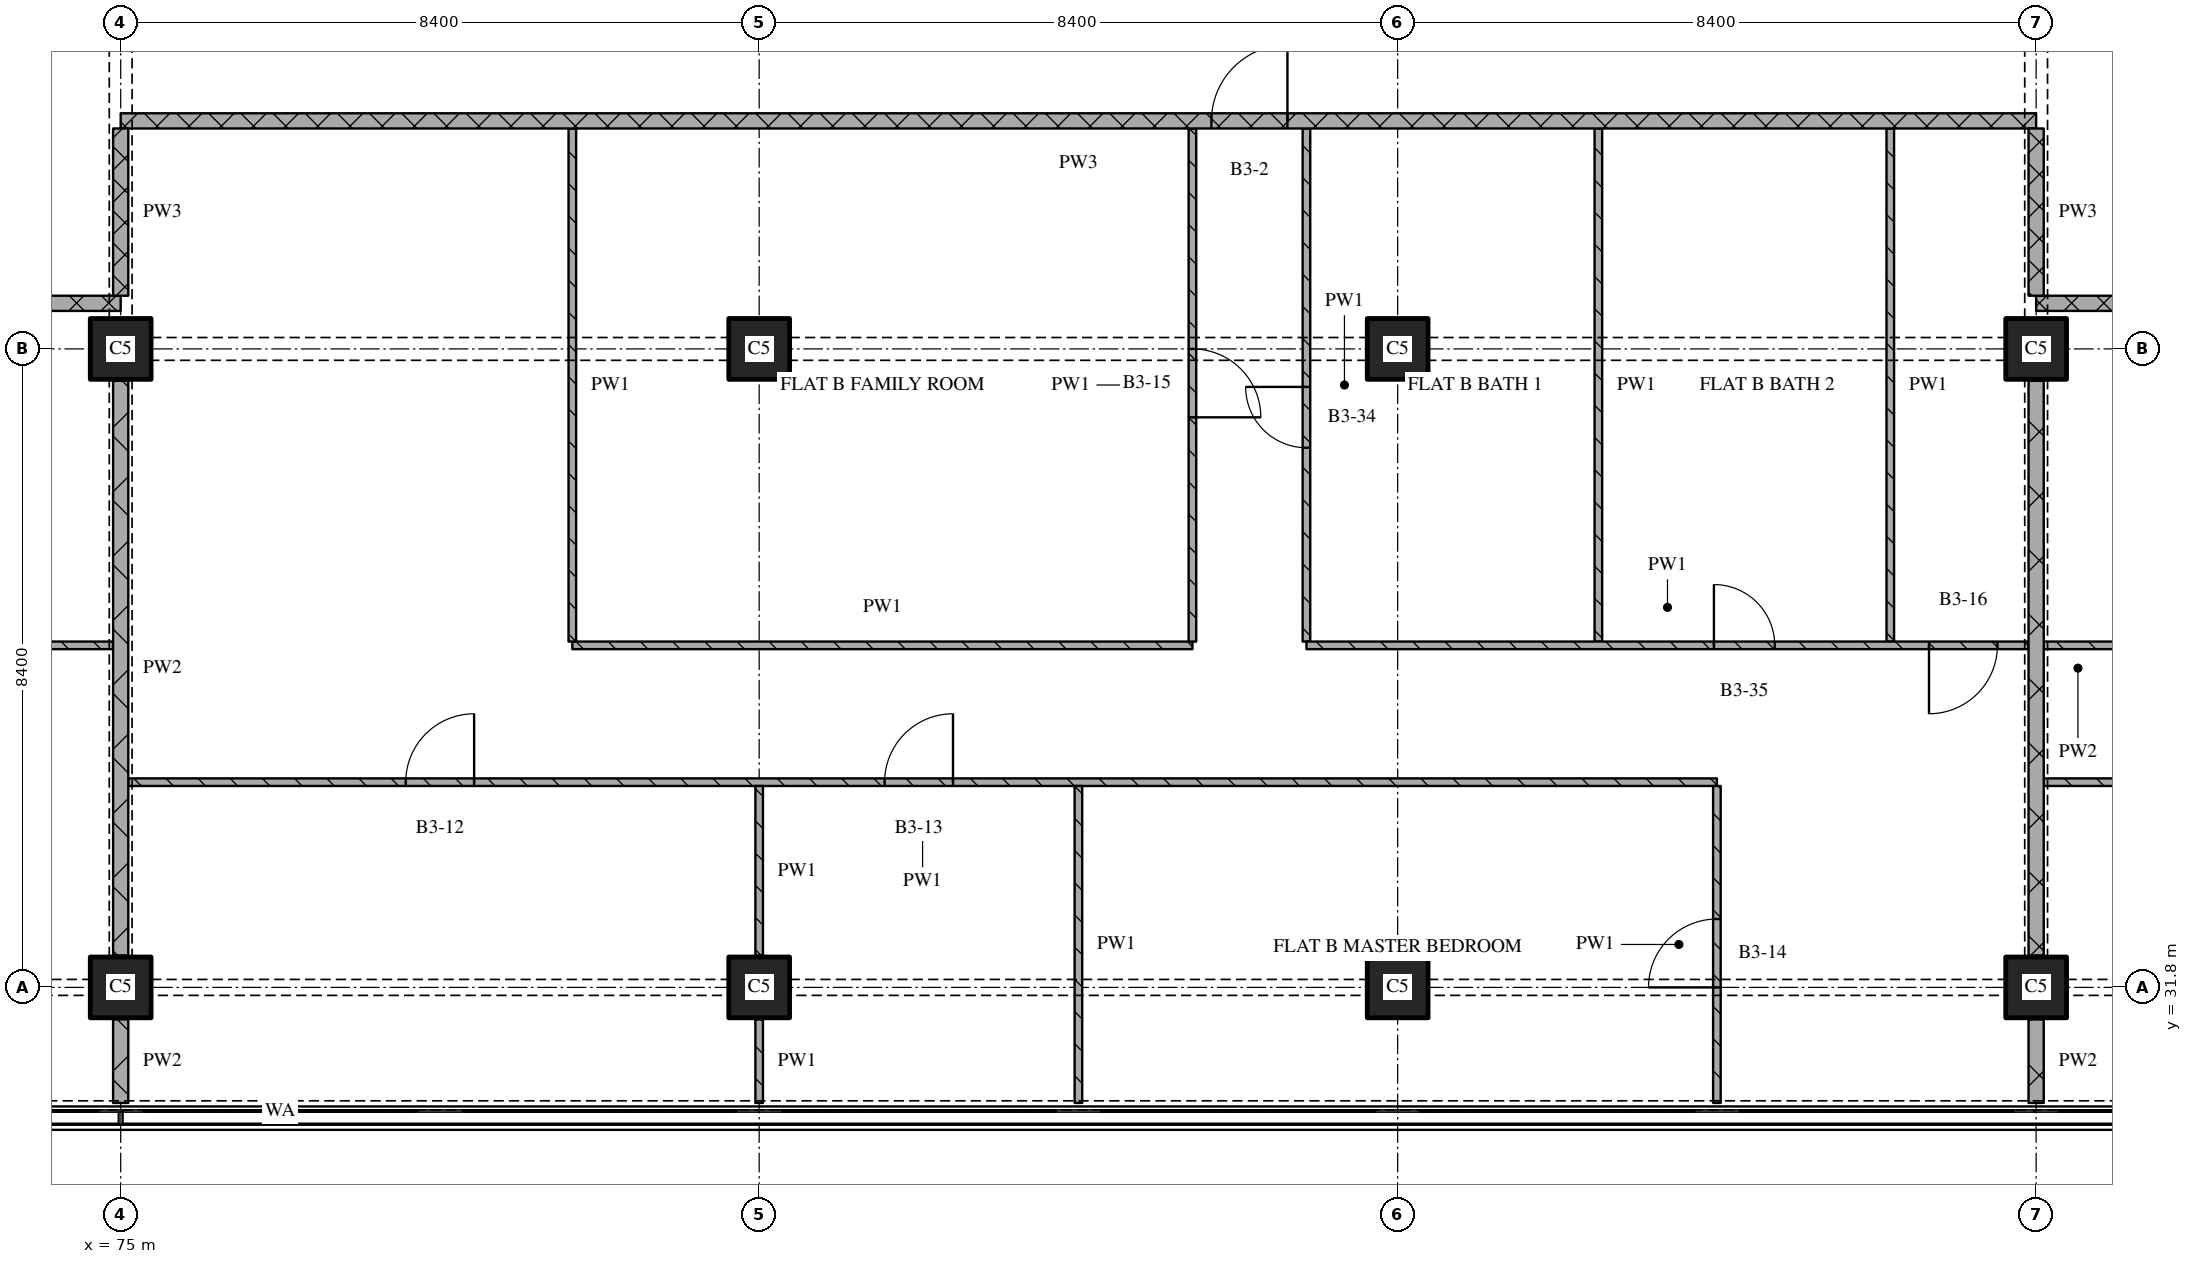
"""IFC4 building model, lengths in metres.
Left out: names, types, materials, properties, quantities, classifications, styles, units other than length and angle.
Written with IfcOpenShell. Run it as: python <this file> out.ifc"""

import sys

from ifc_helpers import new_model, si_unit, direction, frame, frame_2d, origin, origin_2d, place, context, subcontext, project, spatial, rectangle, extrude, element, fill, save


model = new_model("IFC4")
c1 = context("Model", 3, precision=1e-05, world=origin(), true_north=direction((0.0, 1.0)))
c2 = subcontext(c1, "Body", "Model", "MODEL_VIEW")
j1 = project(units=[si_unit("LENGTHUNIT", "METRE"), si_unit("PLANEANGLEUNIT", "RADIAN")], contexts=[c1])
p1 = place(None, origin())
s1 = spatial("IfcSite", under=j1, at=p1, CompositionType="ELEMENT")
p2 = place(p1, origin())
s2 = spatial("IfcBuilding", under=s1, at=p2, CompositionType="ELEMENT")
p3 = place(p2, frame((0.0, 0.0, 116.85)))
s3 = spatial("IfcBuildingStorey", under=s2, at=p3, CompositionType="ELEMENT", Elevation=116.85)
for number, where, z_axis, x_axis in (
    (1, (75.0, 31.8, 0.0), (0.0, 0.0, 1.0), (1.0, 0.0, 0.0)),
    (2, (75.0, 40.2, 0.0), (0.0, 0.0, 1.0), (1.0, 0.0, 0.0)),
    (3, (83.4, 31.8, 0.0), (0.0, 0.0, 1.0), (1.0, 0.0, 0.0)),
    (4, (83.4, 40.2, 0.0), (0.0, 0.0, 1.0), (1.0, 0.0, 0.0)),
    (5, (91.8, 31.8, 0.0), (0.0, 0.0, 1.0), (1.0, 0.0, 0.0)),
    (6, (91.8, 40.2, 0.0), (0.0, 0.0, 1.0), (1.0, 0.0, 0.0)),
    (7, (100.2, 31.8, 0.0), (0.0, 0.0, 1.0), (1.0, 0.0, 0.0)),
    (8, (100.2, 40.2, 0.0), (0.0, 0.0, 1.0), (1.0, 0.0, 0.0)),
):
    element("IfcColumn", number, at=place(p3, frame(where, z_axis=z_axis, x_axis=x_axis)), inside=s3, PredefinedType="COLUMN", context=c2, shape_type="SweptSolid", body=[
        extrude(rectangle(XDim=0.8, YDim=0.8, at=origin_2d()), origin(), (0.0, 0.0, 1.0), 3.6),
    ])
p4 = place(p3, frame((96.0, 34.5, 0.0), z_axis=(0.0, 0.0, 1.0), x_axis=(-1.0, 0.0, 0.0)))
e9 = element("IfcWall", 9, at=p4, inside=s3, PredefinedType="PARTITIONING", context=c2, shape_type="SweptSolid", body=[
    extrude(rectangle(XDim=20.9, YDim=0.1, at=frame_2d((10.45, 0.0))), origin(), (0.0, 0.0, 1.0), 3.32),
])
p5 = place(p4, frame((10.05, 0.0, 0.0)))
e10 = element("IfcOpeningElement", 10, at=p5, cuts=e9, PredefinedType="OPENING", context=c2, shape_type="SweptSolid", body=[
    extrude(rectangle(XDim=0.9, YDim=2.1, at=frame_2d((0.45, 1.05))), frame((0.0, 0.06, 0.0), z_axis=(0.0, -1.0, 0.0), x_axis=(1.0, 0.0, 0.0)), (0.0, 0.0, 1.0), 0.12),
])
p6 = place(p4, frame((16.35, 0.0, 0.0)))
e11 = element("IfcOpeningElement", 11, at=p6, cuts=e9, PredefinedType="OPENING", context=c2, shape_type="SweptSolid", body=[
    extrude(rectangle(XDim=0.9, YDim=2.1, at=frame_2d((0.45, 1.05))), frame((0.0, 0.06, 0.0), z_axis=(0.0, -1.0, 0.0), x_axis=(1.0, 0.0, 0.0)), (0.0, 0.0, 1.0), 0.12),
])
p7 = place(p3, frame((112.8, 34.5, 0.0), z_axis=(0.0, 0.0, 1.0), x_axis=(-1.0, 0.0, 0.0)))
e12 = element("IfcWall", 12, at=p7, inside=s3, PredefinedType="PARTITIONING", context=c2, shape_type="SweptSolid", body=[
    extrude(rectangle(XDim=12.5, YDim=0.1, at=frame_2d((6.25, 0.0))), origin(), (0.0, 0.0, 1.0), 3.32),
])
p8 = place(p7, frame((7.95, 0.0, 0.0)))
e13 = element("IfcOpeningElement", 13, at=p8, cuts=e12, PredefinedType="OPENING", context=c2, shape_type="SweptSolid", body=[
    extrude(rectangle(XDim=0.9, YDim=2.1, at=frame_2d((0.45, 1.05))), frame((0.0, 0.06, 0.0), z_axis=(0.0, -1.0, 0.0), x_axis=(1.0, 0.0, 0.0)), (0.0, 0.0, 1.0), 0.12),
])
p9 = place(p3, frame((64.8, 36.3, 0.0), z_axis=(0.0, 0.0, 1.0), x_axis=(1.0, 0.0, 0.0)))
e14 = element("IfcWall", 14, at=p9, inside=s3, PredefinedType="PARTITIONING", context=c2, shape_type="SweptSolid", body=[
    extrude(rectangle(XDim=10.1, YDim=0.1, at=frame_2d((5.05, 0.0))), origin(), (0.0, 0.0, 1.0), 3.32),
])
p10 = place(p9, frame((6.95, 0.0, 0.0)))
e15 = element("IfcOpeningElement", 15, at=p10, cuts=e14, PredefinedType="OPENING", context=c2, shape_type="SweptSolid", body=[
    extrude(rectangle(XDim=0.8, YDim=2.1, at=frame_2d((0.4, 1.05))), frame((0.0, 0.06, 0.0), z_axis=(0.0, -1.0, 0.0), x_axis=(1.0, 0.0, 0.0)), (0.0, 0.0, 1.0), 0.12),
])
p11 = place(p3, frame((80.942, 36.3, 0.0), z_axis=(0.0, 0.0, 1.0), x_axis=(1.0, 0.0, 0.0)))
e16 = element("IfcWall", 16, at=p11, inside=s3, PredefinedType="PARTITIONING", context=c2, shape_type="SweptSolid", body=[
    extrude(rectangle(XDim=8.158, YDim=0.1, at=frame_2d((4.079, 0.0))), origin(), (0.0, 0.0, 1.0), 3.32),
])
p12 = place(p3, frame((75.0, 40.8, 0.0), z_axis=(0.0, 0.0, 1.0), x_axis=(-1.0, 0.0, 0.0)))
e17 = element("IfcWall", 17, at=p12, inside=s3, PredefinedType="PARTITIONING", context=c2, shape_type="SweptSolid", body=[
    extrude(rectangle(XDim=24.18, YDim=0.2, at=frame_2d((12.09, 0.0))), origin(), (0.0, 0.0, 1.0), 3.32),
])
p13 = place(p12, frame((10.45, 0.0, 0.0)))
e18 = element("IfcOpeningElement", 18, at=p13, cuts=e17, PredefinedType="OPENING", context=c2, shape_type="SweptSolid", body=[
    extrude(rectangle(XDim=1.0, YDim=2.1, at=frame_2d((0.5, 1.05))), frame((0.0, 0.11, 0.0), z_axis=(0.0, -1.0, 0.0), x_axis=(1.0, 0.0, 0.0)), (0.0, 0.0, 1.0), 0.22),
])
p14 = place(p3, frame((124.38, 40.8, 0.0), z_axis=(0.0, 0.0, 1.0), x_axis=(-1.0, 0.0, 0.0)))
e19 = element("IfcWall", 19, at=p14, inside=s3, PredefinedType="PARTITIONING", context=c2, shape_type="SweptSolid", body=[
    extrude(rectangle(XDim=24.18, YDim=0.2, at=frame_2d((12.09, 0.0))), origin(), (0.0, 0.0, 1.0), 3.32),
])
p15 = place(p14, frame((16.33, 0.0, 0.0)))
e20 = element("IfcOpeningElement", 20, at=p15, cuts=e19, PredefinedType="OPENING", context=c2, shape_type="SweptSolid", body=[
    extrude(rectangle(XDim=1.0, YDim=2.1, at=frame_2d((0.5, 1.05))), frame((0.0, 0.11, 0.0), z_axis=(0.0, -1.0, 0.0), x_axis=(1.0, 0.0, 0.0)), (0.0, 0.0, 1.0), 0.22),
])
p16 = place(p3, frame((100.2, 43.2, 0.0), z_axis=(0.0, 0.0, 1.0), x_axis=(-1.0, 0.0, 0.0)))
e21 = element("IfcWall", 21, at=p16, inside=s3, PredefinedType="PARTITIONING", context=c2, shape_type="SweptSolid", body=[
    extrude(rectangle(XDim=25.2, YDim=0.2, at=frame_2d((12.6, 0.0))), origin(), (0.0, 0.0, 1.0), 3.32),
])
p17 = place(p16, frame((9.85, 0.0, 0.0)))
e22 = element("IfcOpeningElement", 22, at=p17, cuts=e21, PredefinedType="OPENING", context=c2, shape_type="SweptSolid", body=[
    extrude(rectangle(XDim=1.0, YDim=2.1, at=frame_2d((0.5, 1.05))), frame((0.0, 0.11, 0.0), z_axis=(0.0, -1.0, 0.0), x_axis=(1.0, 0.0, 0.0)), (0.0, 0.0, 1.0), 0.22),
])
p18 = place(p3, frame((75.0, 43.1, 0.0), z_axis=(0.0, 0.0, 1.0), x_axis=(0.0, -1.0, 0.0)))
e23 = element("IfcWall", 23, at=p18, inside=s3, PredefinedType="PARTITIONING", context=c2, shape_type="SweptSolid", body=[
    extrude(rectangle(XDim=2.2, YDim=0.2, at=frame_2d((1.1, 0.0))), origin(), (0.0, 0.0, 1.0), 2.43),
])
p19 = place(p3, frame((75.0, 31.38, 0.0), z_axis=(0.0, 0.0, 1.0), x_axis=(0.0, -1.0, 0.0)))
e24 = element("IfcWall", 24, at=p19, inside=s3, PredefinedType="PARTITIONING", context=c2, shape_type="SweptSolid", body=[
    extrude(rectangle(XDim=1.1, YDim=0.2, at=frame_2d((0.55, 0.0))), origin(), (0.0, 0.0, 1.0), 3.32),
])
p20 = place(p3, frame((75.0, 39.78, 0.0), z_axis=(0.0, 0.0, 1.0), x_axis=(0.0, -1.0, 0.0)))
e25 = element("IfcWall", 25, at=p20, inside=s3, PredefinedType="PARTITIONING", context=c2, shape_type="SweptSolid", body=[
    extrude(rectangle(XDim=7.56, YDim=0.2, at=frame_2d((3.78, 0.0))), origin(), (0.0, 0.0, 1.0), 2.83),
])
p21 = place(p3, frame((80.942, 43.1, 0.0), z_axis=(0.0, 0.0, 1.0), x_axis=(0.0, -1.0, 0.0)))
e26 = element("IfcWall", 26, at=p21, inside=s3, PredefinedType="PARTITIONING", context=c2, shape_type="SweptSolid", body=[
    extrude(rectangle(XDim=6.75, YDim=0.1, at=frame_2d((3.375, 0.0))), origin(), (0.0, 0.0, 1.0), 3.32),
])
p22 = place(p3, frame((83.4, 31.38, 0.0), z_axis=(0.0, 0.0, 1.0), x_axis=(0.0, -1.0, 0.0)))
e27 = element("IfcWall", 27, at=p22, inside=s3, PredefinedType="PARTITIONING", context=c2, shape_type="SweptSolid", body=[
    extrude(rectangle(XDim=1.1, YDim=0.1, at=frame_2d((0.55, 0.0))), origin(), (0.0, 0.0, 1.0), 3.32),
])
p23 = place(p3, frame((83.4, 34.45, 0.0), z_axis=(0.0, 0.0, 1.0), x_axis=(0.0, -1.0, 0.0)))
e28 = element("IfcWall", 28, at=p23, inside=s3, PredefinedType="PARTITIONING", context=c2, shape_type="SweptSolid", body=[
    extrude(rectangle(XDim=2.23, YDim=0.1, at=frame_2d((1.115, 0.0))), origin(), (0.0, 0.0, 1.0), 3.32),
])
p24 = place(p3, frame((87.6, 34.45, 0.0), z_axis=(0.0, 0.0, 1.0), x_axis=(0.0, -1.0, 0.0)))
e29 = element("IfcWall", 29, at=p24, inside=s3, PredefinedType="PARTITIONING", context=c2, shape_type="SweptSolid", body=[
    extrude(rectangle(XDim=4.17, YDim=0.1, at=frame_2d((2.085, 0.0))), origin(), (0.0, 0.0, 1.0), 3.32),
])
p25 = place(p3, frame((89.1, 36.35, 0.0), z_axis=(0.0, 0.0, 1.0), x_axis=(0.0, 1.0, 0.0)))
e30 = element("IfcWall", 30, at=p25, inside=s3, PredefinedType="PARTITIONING", context=c2, shape_type="SweptSolid", body=[
    extrude(rectangle(XDim=6.75, YDim=0.1, at=frame_2d((3.375, 0.0))), origin(), (0.0, 0.0, 1.0), 3.32),
])
p26 = place(p25, frame((2.95, 0.0, 0.0)))
e31 = element("IfcOpeningElement", 31, at=p26, cuts=e30, PredefinedType="OPENING", context=c2, shape_type="SweptSolid", body=[
    extrude(rectangle(XDim=0.9, YDim=2.1, at=frame_2d((0.45, 1.05))), frame((0.0, 0.06, 0.0), z_axis=(0.0, -1.0, 0.0), x_axis=(1.0, 0.0, 0.0)), (0.0, 0.0, 1.0), 0.12),
])
p27 = place(p3, frame((90.6, 43.1, 0.0), z_axis=(0.0, 0.0, 1.0), x_axis=(0.0, -1.0, 0.0)))
e32 = element("IfcWall", 32, at=p27, inside=s3, PredefinedType="PARTITIONING", context=c2, shape_type="SweptSolid", body=[
    extrude(rectangle(XDim=6.75, YDim=0.1, at=frame_2d((3.375, 0.0))), origin(), (0.0, 0.0, 1.0), 3.32),
])
p28 = place(p27, frame((3.4, 0.0, 0.0)))
e33 = element("IfcOpeningElement", 33, at=p28, cuts=e32, PredefinedType="OPENING", context=c2, shape_type="SweptSolid", body=[
    extrude(rectangle(XDim=0.8, YDim=2.1, at=frame_2d((0.4, 1.05))), frame((0.0, 0.06, 0.0), z_axis=(0.0, -1.0, 0.0), x_axis=(1.0, 0.0, 0.0)), (0.0, 0.0, 1.0), 0.12),
])
p29 = place(p3, frame((94.441, 43.1, 0.0), z_axis=(0.0, 0.0, 1.0), x_axis=(0.0, -1.0, 0.0)))
e34 = element("IfcWall", 34, at=p29, inside=s3, PredefinedType="PARTITIONING", context=c2, shape_type="SweptSolid", body=[
    extrude(rectangle(XDim=6.75, YDim=0.1, at=frame_2d((3.375, 0.0))), origin(), (0.0, 0.0, 1.0), 3.32),
])
p30 = place(p3, frame((96.0, 30.28, 0.0), z_axis=(0.0, 0.0, 1.0), x_axis=(0.0, 1.0, 0.0)))
e35 = element("IfcWall", 35, at=p30, inside=s3, PredefinedType="PARTITIONING", context=c2, shape_type="SweptSolid", body=[
    extrude(rectangle(XDim=4.17, YDim=0.1, at=frame_2d((2.085, 0.0))), origin(), (0.0, 0.0, 1.0), 3.32),
])
p31 = place(p30, frame((1.52, 0.0, 0.0)))
e36 = element("IfcOpeningElement", 36, at=p31, cuts=e35, PredefinedType="OPENING", context=c2, shape_type="SweptSolid", body=[
    extrude(rectangle(XDim=0.9, YDim=2.1, at=frame_2d((0.45, 1.05))), frame((0.0, 0.06, 0.0), z_axis=(0.0, -1.0, 0.0), x_axis=(1.0, 0.0, 0.0)), (0.0, 0.0, 1.0), 0.12),
])
p32 = place(p3, frame((98.281, 43.1, 0.0), z_axis=(0.0, 0.0, 1.0), x_axis=(0.0, -1.0, 0.0)))
e37 = element("IfcWall", 37, at=p32, inside=s3, PredefinedType="PARTITIONING", context=c2, shape_type="SweptSolid", body=[
    extrude(rectangle(XDim=6.75, YDim=0.1, at=frame_2d((3.375, 0.0))), origin(), (0.0, 0.0, 1.0), 3.32),
])
p33 = place(p3, frame((100.2, 43.1, 0.0), z_axis=(0.0, 0.0, 1.0), x_axis=(0.0, -1.0, 0.0)))
e38 = element("IfcWall", 38, at=p33, inside=s3, PredefinedType="PARTITIONING", context=c2, shape_type="SweptSolid", body=[
    extrude(rectangle(XDim=2.2, YDim=0.2, at=frame_2d((1.1, 0.0))), origin(), (0.0, 0.0, 1.0), 2.43),
])
p34 = place(p3, frame((100.2, 31.38, 0.0), z_axis=(0.0, 0.0, 1.0), x_axis=(0.0, -1.0, 0.0)))
e39 = element("IfcWall", 39, at=p34, inside=s3, PredefinedType="PARTITIONING", context=c2, shape_type="SweptSolid", body=[
    extrude(rectangle(XDim=1.1, YDim=0.2, at=frame_2d((0.55, 0.0))), origin(), (0.0, 0.0, 1.0), 3.32),
])
p35 = place(p3, frame((100.2, 39.78, 0.0), z_axis=(0.0, 0.0, 1.0), x_axis=(0.0, -1.0, 0.0)))
e40 = element("IfcWall", 40, at=p35, inside=s3, PredefinedType="PARTITIONING", context=c2, shape_type="SweptSolid", body=[
    extrude(rectangle(XDim=7.56, YDim=0.2, at=frame_2d((3.78, 0.0))), origin(), (0.0, 0.0, 1.0), 2.83),
])
p36 = place(p3, frame((90.6, 36.3, 0.0), z_axis=(0.0, 0.0, 1.0), x_axis=(1.0, 0.0, 0.0)))
e41 = element("IfcWall", 41, at=p36, inside=s3, PredefinedType="PARTITIONING", context=c2, shape_type="SweptSolid", body=[
    extrude(rectangle(XDim=9.5, YDim=0.1, at=frame_2d((4.75, 0.0))), origin(), (0.0, 0.0, 1.0), 3.32),
])
p37 = place(p36, frame((5.361, 0.0, 0.0)))
e42 = element("IfcOpeningElement", 42, at=p37, cuts=e41, PredefinedType="OPENING", context=c2, shape_type="SweptSolid", body=[
    extrude(rectangle(XDim=0.8, YDim=2.1, at=frame_2d((0.4, 1.05))), frame((0.0, 0.06, 0.0), z_axis=(0.0, -1.0, 0.0), x_axis=(1.0, 0.0, 0.0)), (0.0, 0.0, 1.0), 0.12),
])
p38 = place(p36, frame((8.191, 0.0, 0.0)))
e43 = element("IfcOpeningElement", 43, at=p38, cuts=e41, PredefinedType="OPENING", context=c2, shape_type="SweptSolid", body=[
    extrude(rectangle(XDim=0.9, YDim=2.1, at=frame_2d((0.45, 1.05))), frame((0.0, 0.06, 0.0), z_axis=(0.0, -1.0, 0.0), x_axis=(1.0, 0.0, 0.0)), (0.0, 0.0, 1.0), 0.12),
])
p39 = place(p3, frame((100.3, 36.3, 0.0), z_axis=(0.0, 0.0, 1.0), x_axis=(1.0, 0.0, 0.0)))
e44 = element("IfcWall", 44, at=p39, inside=s3, PredefinedType="PARTITIONING", context=c2, shape_type="SweptSolid", body=[
    extrude(rectangle(XDim=6.5, YDim=0.1, at=frame_2d((3.25, 0.0))), origin(), (0.0, 0.0, 1.0), 3.32),
])
p40 = place(p39, frame((1.75, 0.0, 0.0)))
e45 = element("IfcOpeningElement", 45, at=p40, cuts=e44, PredefinedType="OPENING", context=c2, shape_type="SweptSolid", body=[
    extrude(rectangle(XDim=0.8, YDim=2.1, at=frame_2d((0.4, 1.05))), frame((0.0, 0.06, 0.0), z_axis=(0.0, -1.0, 0.0), x_axis=(1.0, 0.0, 0.0)), (0.0, 0.0, 1.0), 0.12),
])
p41 = place(p5, origin())
e46 = element("IfcDoor", 46, at=p41, inside=s3, OperationType="SINGLE_SWING_RIGHT", PredefinedType="DOOR", context=c2, shape_type="SweptSolid", body=[
    extrude(rectangle(XDim=0.9, YDim=2.1, at=frame_2d((0.45, 1.05))), frame((0.0, 0.025, 0.0), z_axis=(0.0, -1.0, 0.0), x_axis=(1.0, 0.0, 0.0)), (0.0, 0.0, 1.0), 0.05),
])
fill(e10, e46)
p42 = place(p6, origin())
e47 = element("IfcDoor", 47, at=p42, inside=s3, OperationType="SINGLE_SWING_RIGHT", PredefinedType="DOOR", context=c2, shape_type="SweptSolid", body=[
    extrude(rectangle(XDim=0.9, YDim=2.1, at=frame_2d((0.45, 1.05))), frame((0.0, 0.025, 0.0), z_axis=(0.0, -1.0, 0.0), x_axis=(1.0, 0.0, 0.0)), (0.0, 0.0, 1.0), 0.05),
])
fill(e11, e47)
p43 = place(p17, origin())
e48 = element("IfcDoor", 48, at=p43, inside=s3, OperationType="SINGLE_SWING_RIGHT", PredefinedType="DOOR", context=c2, shape_type="SweptSolid", body=[
    extrude(rectangle(XDim=1.0, YDim=2.1, at=frame_2d((0.5, 1.05))), frame((0.0, 0.025, 0.0), z_axis=(0.0, -1.0, 0.0), x_axis=(1.0, 0.0, 0.0)), (0.0, 0.0, 1.0), 0.05),
])
fill(e22, e48)
p44 = place(p26, origin())
e49 = element("IfcDoor", 49, at=p44, inside=s3, OperationType="SINGLE_SWING_RIGHT", PredefinedType="DOOR", context=c2, shape_type="SweptSolid", body=[
    extrude(rectangle(XDim=0.9, YDim=2.1, at=frame_2d((0.45, 1.05))), frame((0.0, 0.025, 0.0), z_axis=(0.0, -1.0, 0.0), x_axis=(1.0, 0.0, 0.0)), (0.0, 0.0, 1.0), 0.05),
])
fill(e31, e49)
p45 = place(p28, origin())
e50 = element("IfcDoor", 50, at=p45, inside=s3, OperationType="SINGLE_SWING_RIGHT", PredefinedType="DOOR", context=c2, shape_type="SweptSolid", body=[
    extrude(rectangle(XDim=0.8, YDim=2.1, at=frame_2d((0.4, 1.05))), frame((0.0, 0.025, 0.0), z_axis=(0.0, -1.0, 0.0), x_axis=(1.0, 0.0, 0.0)), (0.0, 0.0, 1.0), 0.05),
])
fill(e33, e50)
p46 = place(p31, origin())
e51 = element("IfcDoor", 51, at=p46, inside=s3, OperationType="SINGLE_SWING_LEFT", PredefinedType="DOOR", context=c2, shape_type="SweptSolid", body=[
    extrude(rectangle(XDim=0.9, YDim=2.1, at=frame_2d((0.45, 1.05))), frame((0.0, 0.025, 0.0), z_axis=(0.0, -1.0, 0.0), x_axis=(1.0, 0.0, 0.0)), (0.0, 0.0, 1.0), 0.05),
])
fill(e36, e51)
p47 = place(p37, origin())
e52 = element("IfcDoor", 52, at=p47, inside=s3, OperationType="SINGLE_SWING_LEFT", PredefinedType="DOOR", context=c2, shape_type="SweptSolid", body=[
    extrude(rectangle(XDim=0.8, YDim=2.1, at=frame_2d((0.4, 1.05))), frame((0.0, 0.025, 0.0), z_axis=(0.0, -1.0, 0.0), x_axis=(1.0, 0.0, 0.0)), (0.0, 0.0, 1.0), 0.05),
])
fill(e42, e52)
p48 = place(p38, origin())
e53 = element("IfcDoor", 53, at=p48, inside=s3, OperationType="SINGLE_SWING_RIGHT", PredefinedType="DOOR", context=c2, shape_type="SweptSolid", body=[
    extrude(rectangle(XDim=0.9, YDim=2.1, at=frame_2d((0.45, 1.05))), frame((0.0, 0.025, 0.0), z_axis=(0.0, -1.0, 0.0), x_axis=(1.0, 0.0, 0.0)), (0.0, 0.0, 1.0), 0.05),
])
fill(e43, e53)
save(model, sys.argv[1])
